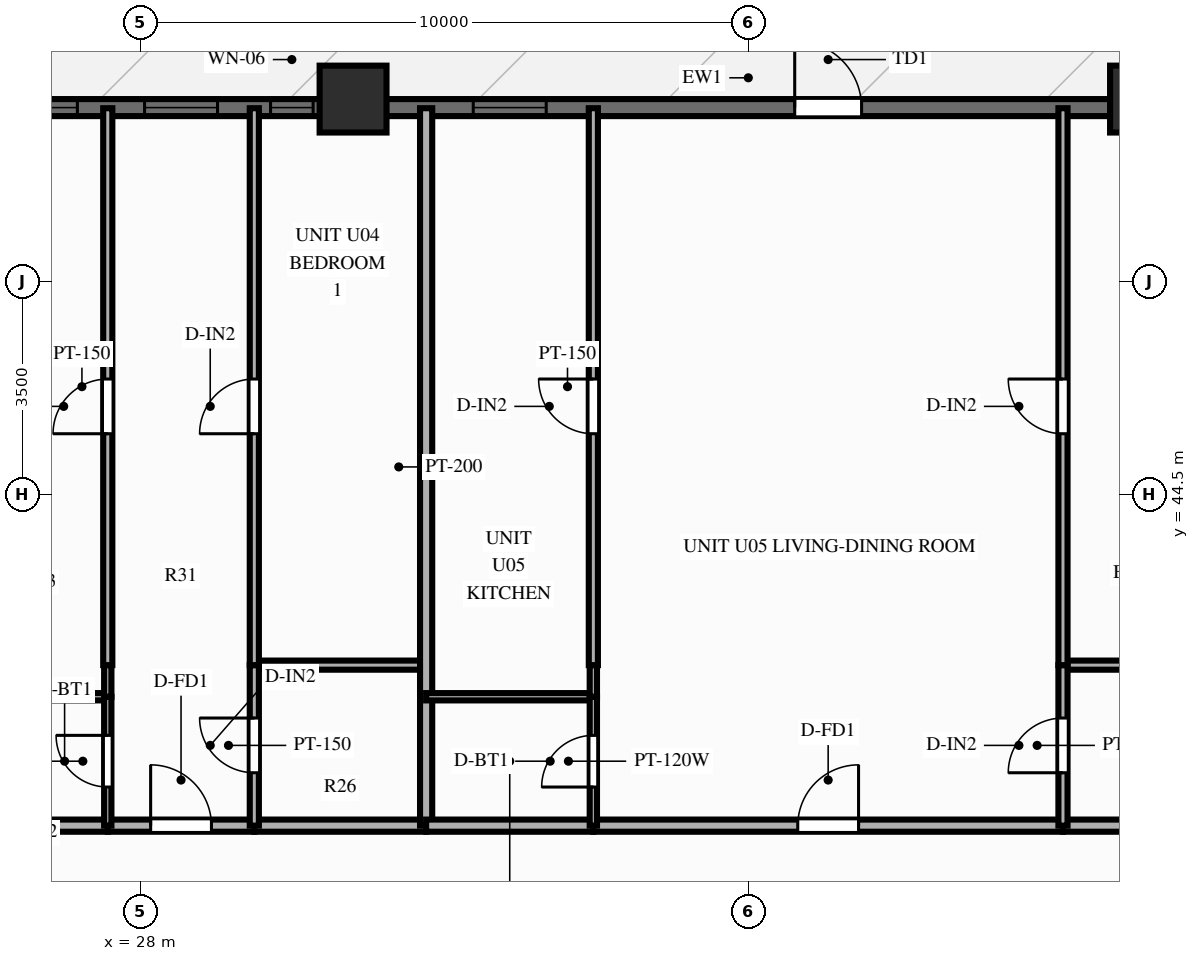
"""IFC4 building model, lengths in metres.
Left out: names, types, materials, properties, quantities, classifications, styles, units other than length and angle.
Written with IfcOpenShell. Run it as: python <this file> out.ifc"""

import sys

from ifc_helpers import new_model, si_unit, direction, frame, frame_2d, origin, origin_2d, place, context, subcontext, project, spatial, rectangle, extrude, source, transform, mapped, element, fill, save


model = new_model("IFC4")
c1 = context("Model", 3, precision=1e-05, world=origin(), true_north=direction((0.0, 1.0)))
c2 = subcontext(c1, "Body", "Model", "MODEL_VIEW")
j1 = project(units=[si_unit("LENGTHUNIT", "METRE"), si_unit("PLANEANGLEUNIT", "RADIAN")], contexts=[c1])
p1 = place(None, origin())
s1 = spatial("IfcSite", under=j1, at=p1, CompositionType="ELEMENT")
p2 = place(p1, origin())
s2 = spatial("IfcBuilding", under=s1, at=p2, CompositionType="ELEMENT")
p3 = place(p2, frame((0.0, 0.0, 49.4)))
s3 = spatial("IfcBuildingStorey", under=s2, at=p3, CompositionType="ELEMENT", Elevation=49.4)
m1 = source(origin(), c2, "Body", "SweptSolid", [
    extrude(rectangle(XDim=1.1, YDim=1.1, at=origin_2d()), origin(), (0.0, 0.0, 1.0), 3.0),
])
for number, where, z_axis, x_axis in (
    (1, (44.5, 51.0, 0.0), (0.0, 0.0, 1.0), (1.0, 0.0, 0.0)),
    (2, (31.5, 51.0, 0.0), (0.0, 0.0, 1.0), (1.0, 0.0, 0.0)),
):
    element("IfcColumn", number, at=place(p3, frame(where, z_axis=z_axis, x_axis=x_axis)), inside=s3, PredefinedType="COLUMN", context=c2, shape_type="MappedRepresentation", body=[
        mapped(m1, transform((0.0, 0.0, 0.0), scale=1.0)),
    ])
p4 = place(p3, frame((15.5, 50.86, 0.0), z_axis=(0.0, 0.0, 1.0), x_axis=(1.0, 0.0, 0.0)))
e3 = element("IfcWall", 3, at=p4, inside=s3, PredefinedType="SOLIDWALL", context=c2, shape_type="SweptSolid", body=[
    extrude(rectangle(XDim=45.0, YDim=0.28, at=frame_2d((22.5, 0.0))), origin(), (0.0, 0.0, 1.0), 2.28),
])
p5 = place(p4, frame((0.76, 0.0, 0.25)))
e4 = element("IfcOpeningElement", 4, at=p5, cuts=e3, PredefinedType="OPENING", context=c2, shape_type="SweptSolid", body=[
    extrude(rectangle(XDim=1.2, YDim=1.5, at=frame_2d((0.6, 0.75))), frame((0.0, 0.152, 0.0), z_axis=(0.0, -1.0, 0.0), x_axis=(1.0, 0.0, 0.0)), (0.0, 0.0, 1.0), 0.304),
])
p6 = place(p4, frame((2.83, 0.0, 0.25)))
e5 = element("IfcOpeningElement", 5, at=p6, cuts=e3, PredefinedType="OPENING", context=c2, shape_type="SweptSolid", body=[
    extrude(rectangle(XDim=1.2, YDim=1.5, at=frame_2d((0.6, 0.75))), frame((0.0, 0.152, 0.0), z_axis=(0.0, -1.0, 0.0), x_axis=(1.0, 0.0, 0.0)), (0.0, 0.0, 1.0), 0.304),
])
p7 = place(p4, frame((5.135, 0.0, 0.25)))
e6 = element("IfcOpeningElement", 6, at=p7, cuts=e3, PredefinedType="OPENING", context=c2, shape_type="SweptSolid", body=[
    extrude(rectangle(XDim=1.2, YDim=1.5, at=frame_2d((0.6, 0.75))), frame((0.0, 0.152, 0.0), z_axis=(0.0, -1.0, 0.0), x_axis=(1.0, 0.0, 0.0)), (0.0, 0.0, 1.0), 0.304),
])
p8 = place(p4, frame((7.753, 0.0, 0.25)))
e7 = element("IfcOpeningElement", 7, at=p8, cuts=e3, PredefinedType="OPENING", context=c2, shape_type="SweptSolid", body=[
    extrude(rectangle(XDim=1.2, YDim=1.5, at=frame_2d((0.6, 0.75))), frame((0.0, 0.152, 0.0), z_axis=(0.0, -1.0, 0.0), x_axis=(1.0, 0.0, 0.0)), (0.0, 0.0, 1.0), 0.304),
])
p9 = place(p4, frame((10.266, 0.0, 0.25)))
e8 = element("IfcOpeningElement", 8, at=p9, cuts=e3, PredefinedType="OPENING", context=c2, shape_type="SweptSolid", body=[
    extrude(rectangle(XDim=1.2, YDim=1.5, at=frame_2d((0.6, 0.75))), frame((0.0, 0.152, 0.0), z_axis=(0.0, -1.0, 0.0), x_axis=(1.0, 0.0, 0.0)), (0.0, 0.0, 1.0), 0.304),
])
p10 = place(p4, frame((12.571, 0.0, 0.25)))
e9 = element("IfcOpeningElement", 9, at=p10, cuts=e3, PredefinedType="OPENING", context=c2, shape_type="SweptSolid", body=[
    extrude(rectangle(XDim=1.2, YDim=1.5, at=frame_2d((0.6, 0.75))), frame((0.0, 0.152, 0.0), z_axis=(0.0, -1.0, 0.0), x_axis=(1.0, 0.0, 0.0)), (0.0, 0.0, 1.0), 0.304),
])
p11 = place(p4, frame((14.643, 0.0, 0.25)))
e10 = element("IfcOpeningElement", 10, at=p11, cuts=e3, PredefinedType="OPENING", context=c2, shape_type="SweptSolid", body=[
    extrude(rectangle(XDim=0.7, YDim=1.5, at=frame_2d((0.35, 0.75))), frame((0.0, 0.152, 0.0), z_axis=(0.0, -1.0, 0.0), x_axis=(1.0, 0.0, 0.0)), (0.0, 0.0, 1.0), 0.304),
])
p12 = place(p4, frame((17.977, 0.0, 0.25)))
e11 = element("IfcOpeningElement", 11, at=p12, cuts=e3, PredefinedType="OPENING", context=c2, shape_type="SweptSolid", body=[
    extrude(rectangle(XDim=1.2, YDim=1.5, at=frame_2d((0.6, 0.75))), frame((0.0, 0.152, 0.0), z_axis=(0.0, -1.0, 0.0), x_axis=(1.0, 0.0, 0.0)), (0.0, 0.0, 1.0), 0.304),
])
p13 = place(p4, frame((23.263, 0.0, 0.0)))
e12 = element("IfcOpeningElement", 12, at=p13, cuts=e3, PredefinedType="OPENING", context=c2, shape_type="SweptSolid", body=[
    extrude(rectangle(XDim=1.1, YDim=2.15, at=frame_2d((0.55, 1.075))), frame((0.0, 0.152, 0.0), z_axis=(0.0, -1.0, 0.0), x_axis=(1.0, 0.0, 0.0)), (0.0, 0.0, 1.0), 0.304),
])
p14 = place(p4, frame((29.832, 0.0, 0.25)))
e13 = element("IfcOpeningElement", 13, at=p14, cuts=e3, PredefinedType="OPENING", context=c2, shape_type="SweptSolid", body=[
    extrude(rectangle(XDim=0.95, YDim=1.5, at=frame_2d((0.475, 0.75))), frame((0.0, 0.152, 0.0), z_axis=(0.0, -1.0, 0.0), x_axis=(1.0, 0.0, 0.0)), (0.0, 0.0, 1.0), 0.304),
])
p15 = place(p4, frame((31.998, 0.0, 0.25)))
e14 = element("IfcOpeningElement", 14, at=p15, cuts=e3, PredefinedType="OPENING", context=c2, shape_type="SweptSolid", body=[
    extrude(rectangle(XDim=1.2, YDim=1.5, at=frame_2d((0.6, 0.75))), frame((0.0, 0.152, 0.0), z_axis=(0.0, -1.0, 0.0), x_axis=(1.0, 0.0, 0.0)), (0.0, 0.0, 1.0), 0.304),
])
p16 = place(p4, frame((37.023, 0.0, 0.25)))
e15 = element("IfcOpeningElement", 15, at=p16, cuts=e3, PredefinedType="OPENING", context=c2, shape_type="SweptSolid", body=[
    extrude(rectangle(XDim=1.2, YDim=1.5, at=frame_2d((0.6, 0.75))), frame((0.0, 0.152, 0.0), z_axis=(0.0, -1.0, 0.0), x_axis=(1.0, 0.0, 0.0)), (0.0, 0.0, 1.0), 0.304),
])
p17 = place(p4, frame((42.341, 0.0, 0.25)))
e16 = element("IfcOpeningElement", 16, at=p17, cuts=e3, PredefinedType="OPENING", context=c2, shape_type="SweptSolid", body=[
    extrude(rectangle(XDim=1.2, YDim=1.5, at=frame_2d((0.6, 0.75))), frame((0.0, 0.152, 0.0), z_axis=(0.0, -1.0, 0.0), x_axis=(1.0, 0.0, 0.0)), (0.0, 0.0, 1.0), 0.304),
])
p18 = place(p3, frame((25.266, 39.05, 0.0), z_axis=(0.0, 0.0, 1.0), x_axis=(1.0, 0.0, 0.0)))
e17 = element("IfcWall", 17, at=p18, inside=s3, PredefinedType="PARTITIONING", context=c2, shape_type="SweptSolid", body=[
    extrude(rectangle(XDim=2.2, YDim=0.2, at=frame_2d((1.1, 0.0))), origin(), (0.0, 0.0, 1.0), 2.79),
])
p19 = place(p3, frame((27.466, 39.05, 0.0), z_axis=(0.0, 0.0, 1.0), x_axis=(1.0, 0.0, 0.0)))
e18 = element("IfcWall", 18, at=p19, inside=s3, PredefinedType="PARTITIONING", context=c2, shape_type="SweptSolid", body=[
    extrude(rectangle(XDim=2.41, YDim=0.2, at=frame_2d((1.205, 0.0))), origin(), (0.0, 0.0, 1.0), 2.79),
])
p20 = place(p19, frame((0.705, 0.0, 0.0)))
e19 = element("IfcOpeningElement", 19, at=p20, cuts=e18, PredefinedType="OPENING", context=c2, shape_type="SweptSolid", body=[
    extrude(rectangle(XDim=1.0, YDim=2.15, at=frame_2d((0.5, 1.075))), frame((0.0, 0.112, 0.0), z_axis=(0.0, -1.0, 0.0), x_axis=(1.0, 0.0, 0.0)), (0.0, 0.0, 1.0), 0.224),
])
p21 = place(p3, frame((29.876, 39.05, 0.0), z_axis=(0.0, 0.0, 1.0), x_axis=(1.0, 0.0, 0.0)))
e20 = element("IfcWall", 20, at=p21, inside=s3, PredefinedType="PARTITIONING", context=c2, shape_type="SweptSolid", body=[
    extrude(rectangle(XDim=2.825, YDim=0.2, at=frame_2d((1.413, 0.0))), origin(), (0.0, 0.0, 1.0), 2.79),
])
p22 = place(p3, frame((25.266, 41.17, 0.0), z_axis=(0.0, 0.0, 1.0), x_axis=(1.0, 0.0, 0.0)))
e21 = element("IfcWall", 21, at=p22, inside=s3, PredefinedType="PARTITIONING", context=c2, shape_type="SweptSolid", body=[
    extrude(rectangle(XDim=2.2, YDim=0.12, at=frame_2d((1.1, 0.0))), origin(), (0.0, 0.0, 1.0), 2.79),
])
p23 = place(p3, frame((29.876, 41.69, 0.0), z_axis=(0.0, 0.0, 1.0), x_axis=(1.0, 0.0, 0.0)))
e22 = element("IfcWall", 22, at=p23, inside=s3, PredefinedType="PARTITIONING", context=c2, shape_type="SweptSolid", body=[
    extrude(rectangle(XDim=2.825, YDim=0.15, at=frame_2d((1.413, 0.0))), origin(), (0.0, 0.0, 1.0), 2.79),
])
p24 = place(p3, frame((27.466, 39.05, 0.0), z_axis=(0.0, 0.0, 1.0), x_axis=(0.0, 1.0, 0.0)))
e23 = element("IfcWall", 23, at=p24, inside=s3, PredefinedType="PARTITIONING", context=c2, shape_type="SweptSolid", body=[
    extrude(rectangle(XDim=2.12, YDim=0.12, at=frame_2d((1.06, 0.0))), origin(), (0.0, 0.0, 1.0), 2.79),
])
p25 = place(p24, frame((0.635, 0.0, 0.0)))
e24 = element("IfcOpeningElement", 24, at=p25, cuts=e23, PredefinedType="OPENING", context=c2, shape_type="SweptSolid", body=[
    extrude(rectangle(XDim=0.85, YDim=2.05, at=frame_2d((0.425, 1.025))), frame((0.0, 0.072, 0.0), z_axis=(0.0, -1.0, 0.0), x_axis=(1.0, 0.0, 0.0)), (0.0, 0.0, 1.0), 0.144),
])
p26 = place(p3, frame((27.466, 41.17, 0.0), z_axis=(0.0, 0.0, 1.0), x_axis=(0.0, 1.0, 0.0)))
e25 = element("IfcWall", 25, at=p26, inside=s3, PredefinedType="PARTITIONING", context=c2, shape_type="SweptSolid", body=[
    extrude(rectangle(XDim=0.52, YDim=0.12, at=frame_2d((0.26, 0.0))), origin(), (0.0, 0.0, 1.0), 2.79),
])
p27 = place(p3, frame((27.466, 41.69, 0.0), z_axis=(0.0, 0.0, 1.0), x_axis=(0.0, 1.0, 0.0)))
e26 = element("IfcWall", 26, at=p27, inside=s3, PredefinedType="PARTITIONING", context=c2, shape_type="SweptSolid", body=[
    extrude(rectangle(XDim=9.16, YDim=0.15, at=frame_2d((4.58, 0.0))), origin(), (0.0, 0.0, 1.0), 2.79),
])
p28 = place(p27, frame((3.806, 0.0, 0.0)))
e27 = element("IfcOpeningElement", 27, at=p28, cuts=e26, PredefinedType="OPENING", context=c2, shape_type="SweptSolid", body=[
    extrude(rectangle(XDim=0.9, YDim=2.1, at=frame_2d((0.45, 1.05))), frame((0.0, 0.087, 0.0), z_axis=(0.0, -1.0, 0.0), x_axis=(1.0, 0.0, 0.0)), (0.0, 0.0, 1.0), 0.174),
])
p29 = place(p3, frame((29.876, 39.05, 0.0), z_axis=(0.0, 0.0, 1.0), x_axis=(0.0, 1.0, 0.0)))
e28 = element("IfcWall", 28, at=p29, inside=s3, PredefinedType="PARTITIONING", context=c2, shape_type="SweptSolid", body=[
    extrude(rectangle(XDim=2.64, YDim=0.15, at=frame_2d((1.32, 0.0))), origin(), (0.0, 0.0, 1.0), 2.79),
])
p30 = place(p29, frame((0.87, 0.0, 0.0)))
e29 = element("IfcOpeningElement", 29, at=p30, cuts=e28, PredefinedType="OPENING", context=c2, shape_type="SweptSolid", body=[
    extrude(rectangle(XDim=0.9, YDim=2.1, at=frame_2d((0.45, 1.05))), frame((0.0, 0.087, 0.0), z_axis=(0.0, -1.0, 0.0), x_axis=(1.0, 0.0, 0.0)), (0.0, 0.0, 1.0), 0.174),
])
p31 = place(p3, frame((29.876, 41.69, 0.0), z_axis=(0.0, 0.0, 1.0), x_axis=(0.0, 1.0, 0.0)))
e30 = element("IfcWall", 30, at=p31, inside=s3, PredefinedType="PARTITIONING", context=c2, shape_type="SweptSolid", body=[
    extrude(rectangle(XDim=9.16, YDim=0.15, at=frame_2d((4.58, 0.0))), origin(), (0.0, 0.0, 1.0), 2.79),
])
p32 = place(p31, frame((3.806, 0.0, 0.0)))
e31 = element("IfcOpeningElement", 31, at=p32, cuts=e30, PredefinedType="OPENING", context=c2, shape_type="SweptSolid", body=[
    extrude(rectangle(XDim=0.9, YDim=2.1, at=frame_2d((0.45, 1.05))), frame((0.0, 0.087, 0.0), z_axis=(0.0, -1.0, 0.0), x_axis=(1.0, 0.0, 0.0)), (0.0, 0.0, 1.0), 0.174),
])
p33 = place(p3, frame((32.701, 39.05, 0.0), z_axis=(0.0, 0.0, 1.0), x_axis=(0.0, 1.0, 0.0)))
e32 = element("IfcWall", 32, at=p33, inside=s3, PredefinedType="PARTITIONING", context=c2, shape_type="SweptSolid", body=[
    extrude(rectangle(XDim=11.8, YDim=0.2, at=frame_2d((5.9, 0.0))), origin(), (0.0, 0.0, 1.0), 2.79),
])
p34 = place(p3, frame((32.701, 39.05, 0.0), z_axis=(0.0, 0.0, 1.0), x_axis=(1.0, 0.0, 0.0)))
e33 = element("IfcWall", 33, at=p34, inside=s3, PredefinedType="PARTITIONING", context=c2, shape_type="SweptSolid", body=[
    extrude(rectangle(XDim=2.75, YDim=0.2, at=frame_2d((1.375, 0.0))), origin(), (0.0, 0.0, 1.0), 2.79),
])
p35 = place(p3, frame((35.451, 39.05, 0.0), z_axis=(0.0, 0.0, 1.0), x_axis=(1.0, 0.0, 0.0)))
e34 = element("IfcWall", 34, at=p35, inside=s3, PredefinedType="PARTITIONING", context=c2, shape_type="SweptSolid", body=[
    extrude(rectangle(XDim=7.724, YDim=0.2, at=frame_2d((3.862, 0.0))), origin(), (0.0, 0.0, 1.0), 2.79),
])
p36 = place(p35, frame((3.362, 0.0, 0.0)))
e35 = element("IfcOpeningElement", 35, at=p36, cuts=e34, PredefinedType="OPENING", context=c2, shape_type="SweptSolid", body=[
    extrude(rectangle(XDim=1.0, YDim=2.15, at=frame_2d((0.5, 1.075))), frame((0.0, 0.112, 0.0), z_axis=(0.0, -1.0, 0.0), x_axis=(1.0, 0.0, 0.0)), (0.0, 0.0, 1.0), 0.224),
])
p37 = place(p3, frame((43.175, 39.05, 0.0), z_axis=(0.0, 0.0, 1.0), x_axis=(1.0, 0.0, 0.0)))
e36 = element("IfcWall", 36, at=p37, inside=s3, PredefinedType="PARTITIONING", context=c2, shape_type="SweptSolid", body=[
    extrude(rectangle(XDim=3.548, YDim=0.2, at=frame_2d((1.774, 0.0))), origin(), (0.0, 0.0, 1.0), 2.79),
])
p38 = place(p3, frame((32.701, 41.17, 0.0), z_axis=(0.0, 0.0, 1.0), x_axis=(1.0, 0.0, 0.0)))
e37 = element("IfcWall", 37, at=p38, inside=s3, PredefinedType="PARTITIONING", context=c2, shape_type="SweptSolid", body=[
    extrude(rectangle(XDim=2.75, YDim=0.12, at=frame_2d((1.375, 0.0))), origin(), (0.0, 0.0, 1.0), 2.79),
])
p39 = place(p3, frame((43.175, 41.69, 0.0), z_axis=(0.0, 0.0, 1.0), x_axis=(1.0, 0.0, 0.0)))
e38 = element("IfcWall", 38, at=p39, inside=s3, PredefinedType="PARTITIONING", context=c2, shape_type="SweptSolid", body=[
    extrude(rectangle(XDim=3.548, YDim=0.15, at=frame_2d((1.774, 0.0))), origin(), (0.0, 0.0, 1.0), 2.79),
])
p40 = place(p3, frame((35.451, 39.05, 0.0), z_axis=(0.0, 0.0, 1.0), x_axis=(0.0, 1.0, 0.0)))
e39 = element("IfcWall", 39, at=p40, inside=s3, PredefinedType="PARTITIONING", context=c2, shape_type="SweptSolid", body=[
    extrude(rectangle(XDim=2.12, YDim=0.12, at=frame_2d((1.06, 0.0))), origin(), (0.0, 0.0, 1.0), 2.79),
])
p41 = place(p40, frame((0.635, 0.0, 0.0)))
e40 = element("IfcOpeningElement", 40, at=p41, cuts=e39, PredefinedType="OPENING", context=c2, shape_type="SweptSolid", body=[
    extrude(rectangle(XDim=0.85, YDim=2.05, at=frame_2d((0.425, 1.025))), frame((0.0, 0.072, 0.0), z_axis=(0.0, -1.0, 0.0), x_axis=(1.0, 0.0, 0.0)), (0.0, 0.0, 1.0), 0.144),
])
p42 = place(p3, frame((35.451, 41.17, 0.0), z_axis=(0.0, 0.0, 1.0), x_axis=(0.0, 1.0, 0.0)))
e41 = element("IfcWall", 41, at=p42, inside=s3, PredefinedType="PARTITIONING", context=c2, shape_type="SweptSolid", body=[
    extrude(rectangle(XDim=0.52, YDim=0.12, at=frame_2d((0.26, 0.0))), origin(), (0.0, 0.0, 1.0), 2.79),
])
p43 = place(p3, frame((35.451, 41.69, 0.0), z_axis=(0.0, 0.0, 1.0), x_axis=(0.0, 1.0, 0.0)))
e42 = element("IfcWall", 42, at=p43, inside=s3, PredefinedType="PARTITIONING", context=c2, shape_type="SweptSolid", body=[
    extrude(rectangle(XDim=9.16, YDim=0.15, at=frame_2d((4.58, 0.0))), origin(), (0.0, 0.0, 1.0), 2.79),
])
p44 = place(p43, frame((3.806, 0.0, 0.0)))
e43 = element("IfcOpeningElement", 43, at=p44, cuts=e42, PredefinedType="OPENING", context=c2, shape_type="SweptSolid", body=[
    extrude(rectangle(XDim=0.9, YDim=2.1, at=frame_2d((0.45, 1.05))), frame((0.0, 0.087, 0.0), z_axis=(0.0, -1.0, 0.0), x_axis=(1.0, 0.0, 0.0)), (0.0, 0.0, 1.0), 0.174),
])
p45 = place(p3, frame((43.175, 39.05, 0.0), z_axis=(0.0, 0.0, 1.0), x_axis=(0.0, 1.0, 0.0)))
e44 = element("IfcWall", 44, at=p45, inside=s3, PredefinedType="PARTITIONING", context=c2, shape_type="SweptSolid", body=[
    extrude(rectangle(XDim=2.64, YDim=0.15, at=frame_2d((1.32, 0.0))), origin(), (0.0, 0.0, 1.0), 2.79),
])
p46 = place(p45, frame((0.87, 0.0, 0.0)))
e45 = element("IfcOpeningElement", 45, at=p46, cuts=e44, PredefinedType="OPENING", context=c2, shape_type="SweptSolid", body=[
    extrude(rectangle(XDim=0.9, YDim=2.1, at=frame_2d((0.45, 1.05))), frame((0.0, 0.087, 0.0), z_axis=(0.0, -1.0, 0.0), x_axis=(1.0, 0.0, 0.0)), (0.0, 0.0, 1.0), 0.174),
])
p47 = place(p3, frame((43.175, 41.69, 0.0), z_axis=(0.0, 0.0, 1.0), x_axis=(0.0, 1.0, 0.0)))
e46 = element("IfcWall", 46, at=p47, inside=s3, PredefinedType="PARTITIONING", context=c2, shape_type="SweptSolid", body=[
    extrude(rectangle(XDim=9.16, YDim=0.15, at=frame_2d((4.58, 0.0))), origin(), (0.0, 0.0, 1.0), 2.79),
])
p48 = place(p47, frame((3.806, 0.0, 0.0)))
e47 = element("IfcOpeningElement", 47, at=p48, cuts=e46, PredefinedType="OPENING", context=c2, shape_type="SweptSolid", body=[
    extrude(rectangle(XDim=0.9, YDim=2.1, at=frame_2d((0.45, 1.05))), frame((0.0, 0.087, 0.0), z_axis=(0.0, -1.0, 0.0), x_axis=(1.0, 0.0, 0.0)), (0.0, 0.0, 1.0), 0.174),
])
m2 = source(origin(), c2, "Body", "SweptSolid", [
    extrude(rectangle(XDim=1.2, YDim=1.5, at=frame_2d((0.6, 0.75))), frame((0.0, 0.03, 0.0), z_axis=(0.0, -1.0, 0.0), x_axis=(1.0, 0.0, 0.0)), (0.0, 0.0, 1.0), 0.06),
])
p49 = place(p9, origin())
e48 = element("IfcWindow", 48, at=p49, inside=s3, PartitioningType="SINGLE_PANEL", PredefinedType="WINDOW", context=c2, shape_type="MappedRepresentation", body=[
    mapped(m2, transform((0.0, 0.0, 0.0), scale=1.0)),
])
fill(e8, e48)
p50 = place(p10, origin())
e49 = element("IfcWindow", 49, at=p50, inside=s3, PartitioningType="SINGLE_PANEL", PredefinedType="WINDOW", context=c2, shape_type="MappedRepresentation", body=[
    mapped(m2, transform((0.0, 0.0, 0.0), scale=1.0)),
])
fill(e9, e49)
m3 = source(origin(), c2, "Body", "SweptSolid", [
    extrude(rectangle(XDim=0.7, YDim=1.5, at=frame_2d((0.35, 0.75))), frame((0.0, 0.03, 0.0), z_axis=(0.0, -1.0, 0.0), x_axis=(1.0, 0.0, 0.0)), (0.0, 0.0, 1.0), 0.06),
])
p51 = place(p11, origin())
e50 = element("IfcWindow", 50, at=p51, inside=s3, PartitioningType="SINGLE_PANEL", PredefinedType="WINDOW", context=c2, shape_type="MappedRepresentation", body=[
    mapped(m3, transform((0.0, 0.0, 0.0), scale=1.0)),
])
fill(e10, e50)
p52 = place(p12, origin())
e51 = element("IfcWindow", 51, at=p52, inside=s3, PartitioningType="SINGLE_PANEL", PredefinedType="WINDOW", context=c2, shape_type="MappedRepresentation", body=[
    mapped(m2, transform((0.0, 0.0, 0.0), scale=1.0)),
])
fill(e11, e51)
m4 = source(origin(), c2, "Body", "SweptSolid", [
    extrude(rectangle(XDim=1.1, YDim=2.15, at=frame_2d((0.55, 1.075))), frame((0.0, 0.025, 0.0), z_axis=(0.0, -1.0, 0.0), x_axis=(1.0, 0.0, 0.0)), (0.0, 0.0, 1.0), 0.05),
])
p53 = place(p13, origin())
e52 = element("IfcDoor", 52, at=p53, inside=s3, OperationType="SINGLE_SWING_LEFT", PredefinedType="DOOR", context=c2, shape_type="MappedRepresentation", body=[
    mapped(m4, transform((0.0, 0.0, 0.0), scale=1.0)),
])
fill(e12, e52)
m5 = source(origin(), c2, "Body", "SweptSolid", [
    extrude(rectangle(XDim=1.0, YDim=2.15, at=frame_2d((0.5, 1.075))), frame((0.0, 0.025, 0.0), z_axis=(0.0, -1.0, 0.0), x_axis=(1.0, 0.0, 0.0)), (0.0, 0.0, 1.0), 0.05),
])
p54 = place(p20, origin())
e53 = element("IfcDoor", 53, at=p54, inside=s3, OperationType="SINGLE_SWING_LEFT", PredefinedType="DOOR", context=c2, shape_type="MappedRepresentation", body=[
    mapped(m5, transform((0.0, 0.0, 0.0), scale=1.0)),
])
fill(e19, e53)
m6 = source(origin(), c2, "Body", "SweptSolid", [
    extrude(rectangle(XDim=0.85, YDim=2.05, at=frame_2d((0.425, 1.025))), frame((0.0, 0.025, 0.0), z_axis=(0.0, -1.0, 0.0), x_axis=(1.0, 0.0, 0.0)), (0.0, 0.0, 1.0), 0.05),
])
p55 = place(p25, origin())
e54 = element("IfcDoor", 54, at=p55, inside=s3, OperationType="SINGLE_SWING_RIGHT", PredefinedType="DOOR", context=c2, shape_type="MappedRepresentation", body=[
    mapped(m6, transform((0.0, 0.0, 0.0), scale=1.0)),
])
fill(e24, e54)
m7 = source(origin(), c2, "Body", "SweptSolid", [
    extrude(rectangle(XDim=0.9, YDim=2.1, at=frame_2d((0.45, 1.05))), frame((0.0, 0.025, 0.0), z_axis=(0.0, -1.0, 0.0), x_axis=(1.0, 0.0, 0.0)), (0.0, 0.0, 1.0), 0.05),
])
p56 = place(p28, origin())
e55 = element("IfcDoor", 55, at=p56, inside=s3, OperationType="SINGLE_SWING_LEFT", PredefinedType="DOOR", context=c2, shape_type="MappedRepresentation", body=[
    mapped(m7, transform((0.0, 0.0, 0.0), scale=1.0)),
])
fill(e27, e55)
p57 = place(p30, origin())
e56 = element("IfcDoor", 56, at=p57, inside=s3, OperationType="SINGLE_SWING_RIGHT", PredefinedType="DOOR", context=c2, shape_type="MappedRepresentation", body=[
    mapped(m7, transform((0.0, 0.0, 0.0), scale=1.0)),
])
fill(e29, e56)
p58 = place(p32, origin())
e57 = element("IfcDoor", 57, at=p58, inside=s3, OperationType="SINGLE_SWING_LEFT", PredefinedType="DOOR", context=c2, shape_type="MappedRepresentation", body=[
    mapped(m7, transform((0.0, 0.0, 0.0), scale=1.0)),
])
fill(e31, e57)
p59 = place(p36, origin())
e58 = element("IfcDoor", 58, at=p59, inside=s3, OperationType="SINGLE_SWING_RIGHT", PredefinedType="DOOR", context=c2, shape_type="MappedRepresentation", body=[
    mapped(m5, transform((0.0, 0.0, 0.0), scale=1.0)),
])
fill(e35, e58)
p60 = place(p41, origin())
e59 = element("IfcDoor", 59, at=p60, inside=s3, OperationType="SINGLE_SWING_LEFT", PredefinedType="DOOR", context=c2, shape_type="MappedRepresentation", body=[
    mapped(m6, transform((0.0, 0.0, 0.0), scale=1.0)),
])
fill(e40, e59)
p61 = place(p44, origin())
e60 = element("IfcDoor", 60, at=p61, inside=s3, OperationType="SINGLE_SWING_RIGHT", PredefinedType="DOOR", context=c2, shape_type="MappedRepresentation", body=[
    mapped(m7, transform((0.0, 0.0, 0.0), scale=1.0)),
])
fill(e43, e60)
p62 = place(p46, origin())
e61 = element("IfcDoor", 61, at=p62, inside=s3, OperationType="SINGLE_SWING_LEFT", PredefinedType="DOOR", context=c2, shape_type="MappedRepresentation", body=[
    mapped(m7, transform((0.0, 0.0, 0.0), scale=1.0)),
])
fill(e45, e61)
p63 = place(p48, origin())
e62 = element("IfcDoor", 62, at=p63, inside=s3, OperationType="SINGLE_SWING_RIGHT", PredefinedType="DOOR", context=c2, shape_type="MappedRepresentation", body=[
    mapped(m7, transform((0.0, 0.0, 0.0), scale=1.0)),
])
fill(e47, e62)
save(model, sys.argv[1])
